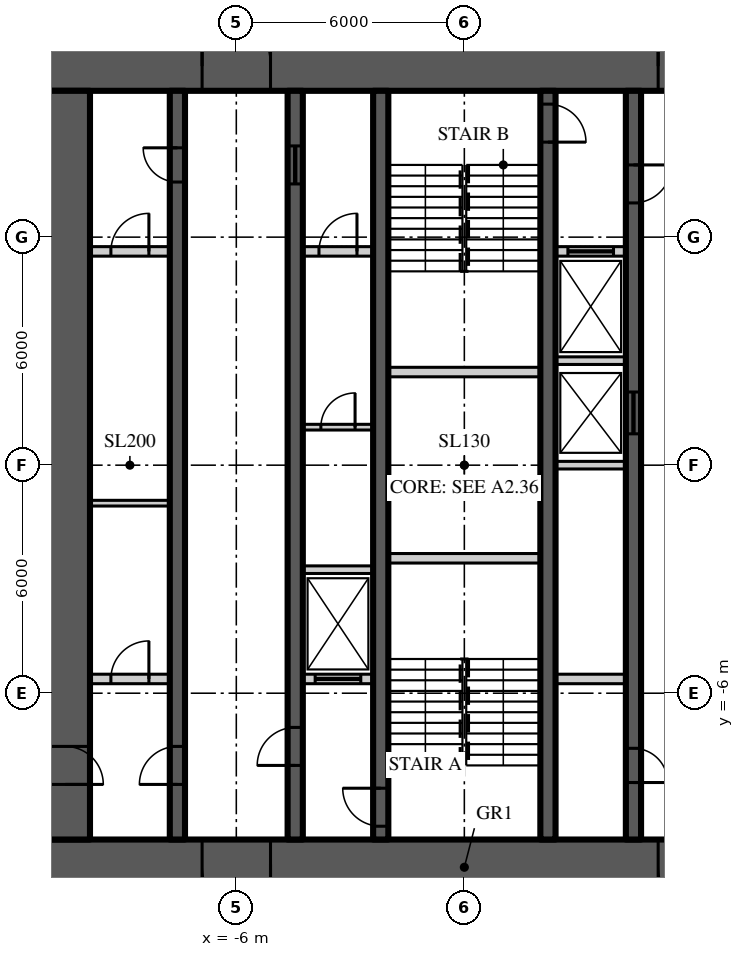
"""IFC4 building model, lengths in metres.
Left out: names, types, materials, properties, quantities, classifications, styles, units other than length and angle.
Written with IfcOpenShell. Run it as: python <this file> out.ifc"""

import sys

from ifc_helpers import new_model, si_unit, direction, frame, frame_2d, origin, place, context, subcontext, project, spatial, rectangle, extrude, element, fill, save


model = new_model("IFC4")
c1 = context("Model", 3, precision=1e-05, world=origin(), true_north=direction((0.0, 1.0)))
c2 = subcontext(c1, "Body", "Model", "MODEL_VIEW")
j1 = project(units=[si_unit("LENGTHUNIT", "METRE"), si_unit("PLANEANGLEUNIT", "RADIAN")], contexts=[c1])
p1 = place(None, origin())
s1 = spatial("IfcSite", under=j1, at=p1, CompositionType="ELEMENT")
p2 = place(p1, origin())
s2 = spatial("IfcBuilding", under=s1, at=p2, CompositionType="ELEMENT")
p3 = place(p2, frame((0.0, 0.0, 279.0)))
s3 = spatial("IfcBuildingStorey", under=s2, at=p3, CompositionType="ELEMENT", Elevation=279.0)
p4 = place(p3, frame((-11.15, 10.5, 0.0), z_axis=(0.0, 0.0, 1.0), x_axis=(1.0, 0.0, 0.0)))
e1 = element("IfcWall", 1, at=p4, inside=s3, PredefinedType="SHEAR", context=c2, shape_type="SweptSolid", body=[
    extrude(rectangle(XDim=22.3, YDim=1.3, at=frame_2d((11.15, 0.0))), origin(), (0.0, 0.0, 1.0), 3.9),
])
p5 = place(p4, frame((4.25, 0.0, 0.0)))
e2 = element("IfcOpeningElement", 2, at=p5, cuts=e1, PredefinedType="OPENING", context=c2, shape_type="SweptSolid", body=[
    extrude(rectangle(XDim=1.8, YDim=2.2, at=frame_2d((0.9, 1.1))), frame((0.0, 0.66, 0.0), z_axis=(0.0, -1.0, 0.0), x_axis=(1.0, 0.0, 0.0)), (0.0, 0.0, 1.0), 1.32),
])
p6 = place(p4, frame((16.25, 0.0, 0.0)))
e3 = element("IfcOpeningElement", 3, at=p6, cuts=e1, PredefinedType="OPENING", context=c2, shape_type="SweptSolid", body=[
    extrude(rectangle(XDim=1.8, YDim=2.2, at=frame_2d((0.9, 1.1))), frame((0.0, 0.66, 0.0), z_axis=(0.0, -1.0, 0.0), x_axis=(1.0, 0.0, 0.0)), (0.0, 0.0, 1.0), 1.32),
])
p7 = place(p3, frame((11.15, -10.5, 0.0), z_axis=(0.0, 0.0, 1.0), x_axis=(-1.0, 0.0, 0.0)))
e4 = element("IfcWall", 4, at=p7, inside=s3, PredefinedType="SHEAR", context=c2, shape_type="SweptSolid", body=[
    extrude(rectangle(XDim=22.3, YDim=1.3, at=frame_2d((11.15, 0.0))), origin(), (0.0, 0.0, 1.0), 3.9),
])
p8 = place(p7, frame((16.25, 0.0, 0.0)))
e5 = element("IfcOpeningElement", 5, at=p8, cuts=e4, PredefinedType="OPENING", context=c2, shape_type="SweptSolid", body=[
    extrude(rectangle(XDim=1.8, YDim=2.2, at=frame_2d((0.9, 1.1))), frame((0.0, 0.66, 0.0), z_axis=(0.0, -1.0, 0.0), x_axis=(1.0, 0.0, 0.0)), (0.0, 0.0, 1.0), 1.32),
])
p9 = place(p7, frame((4.25, 0.0, 0.0)))
e6 = element("IfcOpeningElement", 6, at=p9, cuts=e4, PredefinedType="OPENING", context=c2, shape_type="SweptSolid", body=[
    extrude(rectangle(XDim=1.8, YDim=2.2, at=frame_2d((0.9, 1.1))), frame((0.0, 0.66, 0.0), z_axis=(0.0, -1.0, 0.0), x_axis=(1.0, 0.0, 0.0)), (0.0, 0.0, 1.0), 1.32),
])
p10 = place(p3, frame((-10.5, 9.85, 0.0), z_axis=(0.0, 0.0, 1.0), x_axis=(0.0, -1.0, 0.0)))
e7 = element("IfcWall", 7, at=p10, inside=s3, PredefinedType="SHEAR", context=c2, shape_type="SweptSolid", body=[
    extrude(rectangle(XDim=19.7, YDim=1.3, at=frame_2d((9.85, 0.0))), origin(), (0.0, 0.0, 1.0), 3.9),
])
p11 = place(p10, frame((17.25, 0.0, 0.0)))
e8 = element("IfcOpeningElement", 8, at=p11, cuts=e7, PredefinedType="OPENING", context=c2, shape_type="SweptSolid", body=[
    extrude(rectangle(XDim=1.0, YDim=2.2, at=frame_2d((0.5, 1.1))), frame((0.0, 0.66, 0.0), z_axis=(0.0, -1.0, 0.0), x_axis=(1.0, 0.0, 0.0)), (0.0, 0.0, 1.0), 1.32),
])
p12 = place(p3, frame((-7.55, -9.85, 0.0), z_axis=(0.0, 0.0, 1.0), x_axis=(0.0, 1.0, 0.0)))
e9 = element("IfcWall", 9, at=p12, inside=s3, PredefinedType="SHEAR", context=c2, shape_type="SweptSolid", body=[
    extrude(rectangle(XDim=19.7, YDim=0.4, at=frame_2d((9.85, 0.0))), origin(), (0.0, 0.0, 1.0), 3.9),
])
p13 = place(p12, frame((1.45, 0.0, 0.0)))
e10 = element("IfcOpeningElement", 10, at=p13, cuts=e9, PredefinedType="OPENING", context=c2, shape_type="SweptSolid", body=[
    extrude(rectangle(XDim=1.0, YDim=2.2, at=frame_2d((0.5, 1.1))), frame((0.0, 0.21, 0.0), z_axis=(0.0, -1.0, 0.0), x_axis=(1.0, 0.0, 0.0)), (0.0, 0.0, 1.0), 0.42),
])
p14 = place(p12, frame((17.3, 0.0, 0.0)))
e11 = element("IfcOpeningElement", 11, at=p14, cuts=e9, PredefinedType="OPENING", context=c2, shape_type="SweptSolid", body=[
    extrude(rectangle(XDim=0.9, YDim=2.1, at=frame_2d((0.45, 1.05))), frame((0.0, 0.21, 0.0), z_axis=(0.0, -1.0, 0.0), x_axis=(1.0, 0.0, 0.0)), (0.0, 0.0, 1.0), 0.42),
])
p15 = place(p3, frame((-4.45, -9.85, 0.0), z_axis=(0.0, 0.0, 1.0), x_axis=(0.0, 1.0, 0.0)))
e12 = element("IfcWall", 12, at=p15, inside=s3, PredefinedType="SHEAR", context=c2, shape_type="SweptSolid", body=[
    extrude(rectangle(XDim=19.7, YDim=0.4, at=frame_2d((9.85, 0.0))), origin(), (0.0, 0.0, 1.0), 3.9),
])
p16 = place(p15, frame((1.95, 0.0, 0.0)))
e13 = element("IfcOpeningElement", 13, at=p16, cuts=e12, PredefinedType="OPENING", context=c2, shape_type="SweptSolid", body=[
    extrude(rectangle(XDim=1.0, YDim=2.2, at=frame_2d((0.5, 1.1))), frame((0.0, 0.21, 0.0), z_axis=(0.0, -1.0, 0.0), x_axis=(1.0, 0.0, 0.0)), (0.0, 0.0, 1.0), 0.42),
])
p17 = place(p15, frame((17.25, 0.0, 0.0)))
e14 = element("IfcOpeningElement", 14, at=p17, cuts=e12, PredefinedType="OPENING", context=c2, shape_type="SweptSolid", body=[
    extrude(rectangle(XDim=1.0, YDim=2.1, at=frame_2d((0.5, 1.05))), frame((0.0, 0.21, 0.0), z_axis=(0.0, -1.0, 0.0), x_axis=(1.0, 0.0, 0.0)), (0.0, 0.0, 1.0), 0.42),
])
p18 = place(p3, frame((4.45, 9.85, 0.0), z_axis=(0.0, 0.0, 1.0), x_axis=(0.0, -1.0, 0.0)))
e15 = element("IfcWall", 15, at=p18, inside=s3, PredefinedType="SHEAR", context=c2, shape_type="SweptSolid", body=[
    extrude(rectangle(XDim=19.7, YDim=0.4, at=frame_2d((9.85, 0.0))), origin(), (0.0, 0.0, 1.0), 3.9),
])
p19 = place(p18, frame((1.95, 0.0, 0.0)))
e16 = element("IfcOpeningElement", 16, at=p19, cuts=e15, PredefinedType="OPENING", context=c2, shape_type="SweptSolid", body=[
    extrude(rectangle(XDim=1.0, YDim=2.2, at=frame_2d((0.5, 1.1))), frame((0.0, 0.21, 0.0), z_axis=(0.0, -1.0, 0.0), x_axis=(1.0, 0.0, 0.0)), (0.0, 0.0, 1.0), 0.42),
])
p20 = place(p18, frame((17.3, 0.0, 0.0)))
e17 = element("IfcOpeningElement", 17, at=p20, cuts=e15, PredefinedType="OPENING", context=c2, shape_type="SweptSolid", body=[
    extrude(rectangle(XDim=0.9, YDim=2.1, at=frame_2d((0.45, 1.05))), frame((0.0, 0.21, 0.0), z_axis=(0.0, -1.0, 0.0), x_axis=(1.0, 0.0, 0.0)), (0.0, 0.0, 1.0), 0.42),
])
p21 = place(p18, frame((7.925, 0.0, 0.0)))
e18 = element("IfcOpeningElement", 18, at=p21, cuts=e15, PredefinedType="OPENING", context=c2, shape_type="SweptSolid", body=[
    extrude(rectangle(XDim=1.1, YDim=2.2, at=frame_2d((0.55, 1.1))), frame((0.0, 0.21, 0.0), z_axis=(0.0, -1.0, 0.0), x_axis=(1.0, 0.0, 0.0)), (0.0, 0.0, 1.0), 0.42),
])
p22 = place(p3, frame((-2.2, -9.85, 0.0), z_axis=(0.0, 0.0, 1.0), x_axis=(0.0, 1.0, 0.0)))
e19 = element("IfcWall", 19, at=p22, inside=s3, PredefinedType="SHEAR", context=c2, shape_type="SweptSolid", body=[
    extrude(rectangle(XDim=19.7, YDim=0.4, at=frame_2d((9.85, 0.0))), origin(), (0.0, 0.0, 1.0), 3.9),
])
p23 = place(p22, frame((0.35, 0.0, 0.0)))
e20 = element("IfcOpeningElement", 20, at=p23, cuts=e19, PredefinedType="OPENING", context=c2, shape_type="SweptSolid", body=[
    extrude(rectangle(XDim=1.0, YDim=2.2, at=frame_2d((0.5, 1.1))), frame((0.0, 0.21, 0.0), z_axis=(0.0, -1.0, 0.0), x_axis=(1.0, 0.0, 0.0)), (0.0, 0.0, 1.0), 0.42),
])
p24 = place(p3, frame((2.2, 9.85, 0.0), z_axis=(0.0, 0.0, 1.0), x_axis=(0.0, -1.0, 0.0)))
e21 = element("IfcWall", 21, at=p24, inside=s3, PredefinedType="SHEAR", context=c2, shape_type="SweptSolid", body=[
    extrude(rectangle(XDim=19.7, YDim=0.4, at=frame_2d((9.85, 0.0))), origin(), (0.0, 0.0, 1.0), 3.9),
])
p25 = place(p24, frame((0.35, 0.0, 0.0)))
e22 = element("IfcOpeningElement", 22, at=p25, cuts=e21, PredefinedType="OPENING", context=c2, shape_type="SweptSolid", body=[
    extrude(rectangle(XDim=1.0, YDim=2.2, at=frame_2d((0.5, 1.1))), frame((0.0, 0.21, 0.0), z_axis=(0.0, -1.0, 0.0), x_axis=(1.0, 0.0, 0.0)), (0.0, 0.0, 1.0), 0.42),
])
p26 = place(p3, frame((-9.85, 5.625, 0.0), z_axis=(0.0, 0.0, 1.0), x_axis=(1.0, 0.0, 0.0)))
e23 = element("IfcWall", 23, at=p26, inside=s3, PredefinedType="SOLIDWALL", context=c2, shape_type="SweptSolid", body=[
    extrude(rectangle(XDim=2.1, YDim=0.25, at=frame_2d((1.05, 0.0))), origin(), (0.0, 0.0, 1.0), 3.7),
])
p27 = place(p26, frame((0.55, 0.0, 0.0)))
e24 = element("IfcOpeningElement", 24, at=p27, cuts=e23, PredefinedType="OPENING", context=c2, shape_type="SweptSolid", body=[
    extrude(rectangle(XDim=1.0, YDim=2.2, at=frame_2d((0.5, 1.1))), frame((0.0, 0.135, 0.0), z_axis=(0.0, -1.0, 0.0), x_axis=(1.0, 0.0, 0.0)), (0.0, 0.0, 1.0), 0.27),
])
p28 = place(p3, frame((-4.25, 5.625, 0.0), z_axis=(0.0, 0.0, 1.0), x_axis=(1.0, 0.0, 0.0)))
e25 = element("IfcWall", 25, at=p28, inside=s3, PredefinedType="SOLIDWALL", context=c2, shape_type="SweptSolid", body=[
    extrude(rectangle(XDim=1.85, YDim=0.25, at=frame_2d((0.925, 0.0))), origin(), (0.0, 0.0, 1.0), 3.7),
])
p29 = place(p28, frame((0.425, 0.0, 0.0)))
e26 = element("IfcOpeningElement", 26, at=p29, cuts=e25, PredefinedType="OPENING", context=c2, shape_type="SweptSolid", body=[
    extrude(rectangle(XDim=1.0, YDim=2.2, at=frame_2d((0.5, 1.1))), frame((0.0, 0.135, 0.0), z_axis=(0.0, -1.0, 0.0), x_axis=(1.0, 0.0, 0.0)), (0.0, 0.0, 1.0), 0.27),
])
p30 = place(p3, frame((2.4, 5.625, 0.0), z_axis=(0.0, 0.0, 1.0), x_axis=(1.0, 0.0, 0.0)))
e27 = element("IfcWall", 27, at=p30, inside=s3, PredefinedType="SOLIDWALL", context=c2, shape_type="SweptSolid", body=[
    extrude(rectangle(XDim=1.85, YDim=0.25, at=frame_2d((0.925, 0.0))), origin(), (0.0, 0.0, 1.0), 3.7),
])
p31 = place(p30, frame((0.325, 0.0, 0.0)))
e28 = element("IfcOpeningElement", 28, at=p31, cuts=e27, PredefinedType="OPENING", context=c2, shape_type="SweptSolid", body=[
    extrude(rectangle(XDim=1.2, YDim=2.2, at=frame_2d((0.6, 1.1))), frame((0.0, 0.135, 0.0), z_axis=(0.0, -1.0, 0.0), x_axis=(1.0, 0.0, 0.0)), (0.0, 0.0, 1.0), 0.27),
])
p32 = place(p3, frame((-9.85, -5.625, 0.0), z_axis=(0.0, 0.0, 1.0), x_axis=(1.0, 0.0, 0.0)))
e29 = element("IfcWall", 29, at=p32, inside=s3, PredefinedType="SOLIDWALL", context=c2, shape_type="SweptSolid", body=[
    extrude(rectangle(XDim=2.1, YDim=0.25, at=frame_2d((1.05, 0.0))), origin(), (0.0, 0.0, 1.0), 3.7),
])
p33 = place(p32, frame((0.55, 0.0, 0.0)))
e30 = element("IfcOpeningElement", 30, at=p33, cuts=e29, PredefinedType="OPENING", context=c2, shape_type="SweptSolid", body=[
    extrude(rectangle(XDim=1.0, YDim=2.2, at=frame_2d((0.5, 1.1))), frame((0.0, 0.135, 0.0), z_axis=(0.0, -1.0, 0.0), x_axis=(1.0, 0.0, 0.0)), (0.0, 0.0, 1.0), 0.27),
])
p34 = place(p3, frame((-4.25, -5.625, 0.0), z_axis=(0.0, 0.0, 1.0), x_axis=(1.0, 0.0, 0.0)))
e31 = element("IfcWall", 31, at=p34, inside=s3, PredefinedType="SOLIDWALL", context=c2, shape_type="SweptSolid", body=[
    extrude(rectangle(XDim=1.85, YDim=0.25, at=frame_2d((0.925, 0.0))), origin(), (0.0, 0.0, 1.0), 3.7),
])
p35 = place(p34, frame((0.325, 0.0, 0.0)))
e32 = element("IfcOpeningElement", 32, at=p35, cuts=e31, PredefinedType="OPENING", context=c2, shape_type="SweptSolid", body=[
    extrude(rectangle(XDim=1.2, YDim=2.2, at=frame_2d((0.6, 1.1))), frame((0.0, 0.135, 0.0), z_axis=(0.0, -1.0, 0.0), x_axis=(1.0, 0.0, 0.0)), (0.0, 0.0, 1.0), 0.27),
])
p36 = place(p3, frame((2.4, -5.625, 0.0), z_axis=(0.0, 0.0, 1.0), x_axis=(1.0, 0.0, 0.0)))
e33 = element("IfcWall", 33, at=p36, inside=s3, PredefinedType="SOLIDWALL", context=c2, shape_type="SweptSolid", body=[
    extrude(rectangle(XDim=1.85, YDim=0.25, at=frame_2d((0.925, 0.0))), origin(), (0.0, 0.0, 1.0), 3.7),
])
for number, where, z_axis, x_axis in (
    (34, (-2.0, -2.45, 0.0), (0.0, 0.0, 1.0), (1.0, 0.0, 0.0)),
    (35, (-2.0, 2.45, 0.0), (0.0, 0.0, 1.0), (1.0, 0.0, 0.0)),
):
    element("IfcWall", number, at=place(p3, frame(where, z_axis=z_axis, x_axis=x_axis)), inside=s3, PredefinedType="SOLIDWALL", context=c2, shape_type="SweptSolid", body=[
        extrude(rectangle(XDim=4.0, YDim=0.25, at=frame_2d((2.0, 0.0))), origin(), (0.0, 0.0, 1.0), 3.7),
    ])
for number, where, z_axis, x_axis in (
    (36, (-4.25, -2.75, 0.0), (0.0, 0.0, 1.0), (1.0, 0.0, 0.0)),
    (37, (2.4, 0.0, 0.0), (0.0, 0.0, 1.0), (1.0, 0.0, 0.0)),
    (38, (2.4, 2.75, 0.0), (0.0, 0.0, 1.0), (1.0, 0.0, 0.0)),
):
    element("IfcWall", number, at=place(p3, frame(where, z_axis=z_axis, x_axis=x_axis)), inside=s3, PredefinedType="SOLIDWALL", context=c2, shape_type="SweptSolid", body=[
        extrude(rectangle(XDim=1.85, YDim=0.2, at=frame_2d((0.925, 0.0))), origin(), (0.0, 0.0, 1.0), 3.7),
    ])
p37 = place(p3, frame((-9.85, -1.0, 0.0), z_axis=(0.0, 0.0, 1.0), x_axis=(1.0, 0.0, 0.0)))
e39 = element("IfcWall", 39, at=p37, inside=s3, PredefinedType="SOLIDWALL", context=c2, shape_type="SweptSolid", body=[
    extrude(rectangle(XDim=2.1, YDim=0.15, at=frame_2d((1.05, 0.0))), origin(), (0.0, 0.0, 1.0), 3.77),
])
p38 = place(p3, frame((-4.25, 1.0, 0.0), z_axis=(0.0, 0.0, 1.0), x_axis=(1.0, 0.0, 0.0)))
e40 = element("IfcWall", 40, at=p38, inside=s3, PredefinedType="SOLIDWALL", context=c2, shape_type="SweptSolid", body=[
    extrude(rectangle(XDim=1.85, YDim=0.15, at=frame_2d((0.925, 0.0))), origin(), (0.0, 0.0, 1.0), 3.77),
])
p39 = place(p38, frame((0.475, 0.0, 0.0)))
e41 = element("IfcOpeningElement", 41, at=p39, cuts=e40, PredefinedType="OPENING", context=c2, shape_type="SweptSolid", body=[
    extrude(rectangle(XDim=0.9, YDim=2.1, at=frame_2d((0.45, 1.05))), frame((0.0, 0.085, 0.0), z_axis=(0.0, -1.0, 0.0), x_axis=(1.0, 0.0, 0.0)), (0.0, 0.0, 1.0), 0.17),
])
p40 = place(p5, origin())
e42 = element("IfcDoor", 42, at=p40, inside=s3, OperationType="DOUBLE_DOOR_DOUBLE_SWING", PredefinedType="DOOR", context=c2, shape_type="SweptSolid", body=[
    extrude(rectangle(XDim=1.8, YDim=2.2, at=frame_2d((0.9, 1.1))), frame((0.0, 0.025, 0.0), z_axis=(0.0, -1.0, 0.0), x_axis=(1.0, 0.0, 0.0)), (0.0, 0.0, 1.0), 0.05),
])
fill(e2, e42)
p41 = place(p8, origin())
e43 = element("IfcDoor", 43, at=p41, inside=s3, OperationType="DOUBLE_DOOR_DOUBLE_SWING", PredefinedType="DOOR", context=c2, shape_type="SweptSolid", body=[
    extrude(rectangle(XDim=1.8, YDim=2.2, at=frame_2d((0.9, 1.1))), frame((0.0, 0.025, 0.0), z_axis=(0.0, -1.0, 0.0), x_axis=(1.0, 0.0, 0.0)), (0.0, 0.0, 1.0), 0.05),
])
fill(e5, e43)
p42 = place(p6, origin())
e44 = element("IfcDoor", 44, at=p42, inside=s3, OperationType="DOUBLE_DOOR_DOUBLE_SWING", PredefinedType="DOOR", context=c2, shape_type="SweptSolid", body=[
    extrude(rectangle(XDim=1.8, YDim=2.2, at=frame_2d((0.9, 1.1))), frame((0.0, 0.025, 0.0), z_axis=(0.0, -1.0, 0.0), x_axis=(1.0, 0.0, 0.0)), (0.0, 0.0, 1.0), 0.05),
])
fill(e3, e44)
p43 = place(p9, origin())
e45 = element("IfcDoor", 45, at=p43, inside=s3, OperationType="DOUBLE_DOOR_DOUBLE_SWING", PredefinedType="DOOR", context=c2, shape_type="SweptSolid", body=[
    extrude(rectangle(XDim=1.8, YDim=2.2, at=frame_2d((0.9, 1.1))), frame((0.0, 0.025, 0.0), z_axis=(0.0, -1.0, 0.0), x_axis=(1.0, 0.0, 0.0)), (0.0, 0.0, 1.0), 0.05),
])
fill(e6, e45)
p44 = place(p13, origin())
e46 = element("IfcDoor", 46, at=p44, inside=s3, OperationType="SINGLE_SWING_LEFT", PredefinedType="DOOR", context=c2, shape_type="SweptSolid", body=[
    extrude(rectangle(XDim=1.0, YDim=2.2, at=frame_2d((0.5, 1.1))), frame((0.0, 0.025, 0.0), z_axis=(0.0, -1.0, 0.0), x_axis=(1.0, 0.0, 0.0)), (0.0, 0.0, 1.0), 0.05),
])
fill(e10, e46)
p45 = place(p11, origin())
e47 = element("IfcDoor", 47, at=p45, inside=s3, OperationType="SINGLE_SWING_RIGHT", PredefinedType="DOOR", context=c2, shape_type="SweptSolid", body=[
    extrude(rectangle(XDim=1.0, YDim=2.2, at=frame_2d((0.5, 1.1))), frame((0.0, 0.025, 0.0), z_axis=(0.0, -1.0, 0.0), x_axis=(1.0, 0.0, 0.0)), (0.0, 0.0, 1.0), 0.05),
])
fill(e8, e47)
p46 = place(p16, origin())
e48 = element("IfcDoor", 48, at=p46, inside=s3, OperationType="SINGLE_SWING_LEFT", PredefinedType="DOOR", context=c2, shape_type="SweptSolid", body=[
    extrude(rectangle(XDim=1.0, YDim=2.2, at=frame_2d((0.5, 1.1))), frame((0.0, 0.025, 0.0), z_axis=(0.0, -1.0, 0.0), x_axis=(1.0, 0.0, 0.0)), (0.0, 0.0, 1.0), 0.05),
])
fill(e13, e48)
p47 = place(p23, origin())
e49 = element("IfcDoor", 49, at=p47, inside=s3, OperationType="SINGLE_SWING_RIGHT", PredefinedType="DOOR", context=c2, shape_type="SweptSolid", body=[
    extrude(rectangle(XDim=1.0, YDim=2.2, at=frame_2d((0.5, 1.1))), frame((0.0, 0.025, 0.0), z_axis=(0.0, -1.0, 0.0), x_axis=(1.0, 0.0, 0.0)), (0.0, 0.0, 1.0), 0.05),
])
fill(e20, e49)
p48 = place(p19, origin())
e50 = element("IfcDoor", 50, at=p48, inside=s3, OperationType="SINGLE_SWING_LEFT", PredefinedType="DOOR", context=c2, shape_type="SweptSolid", body=[
    extrude(rectangle(XDim=1.0, YDim=2.2, at=frame_2d((0.5, 1.1))), frame((0.0, 0.025, 0.0), z_axis=(0.0, -1.0, 0.0), x_axis=(1.0, 0.0, 0.0)), (0.0, 0.0, 1.0), 0.05),
])
fill(e16, e50)
p49 = place(p25, origin())
e51 = element("IfcDoor", 51, at=p49, inside=s3, OperationType="SINGLE_SWING_RIGHT", PredefinedType="DOOR", context=c2, shape_type="SweptSolid", body=[
    extrude(rectangle(XDim=1.0, YDim=2.2, at=frame_2d((0.5, 1.1))), frame((0.0, 0.025, 0.0), z_axis=(0.0, -1.0, 0.0), x_axis=(1.0, 0.0, 0.0)), (0.0, 0.0, 1.0), 0.05),
])
fill(e22, e51)
p50 = place(p14, origin())
e52 = element("IfcDoor", 52, at=p50, inside=s3, OperationType="SINGLE_SWING_RIGHT", PredefinedType="DOOR", context=c2, shape_type="SweptSolid", body=[
    extrude(rectangle(XDim=0.9, YDim=2.1, at=frame_2d((0.45, 1.05))), frame((0.0, 0.025, 0.0), z_axis=(0.0, -1.0, 0.0), x_axis=(1.0, 0.0, 0.0)), (0.0, 0.0, 1.0), 0.05),
])
fill(e11, e52)
p51 = place(p17, origin())
e53 = element("IfcDoor", 53, at=p51, inside=s3, OperationType="SLIDING_TO_LEFT", PredefinedType="DOOR", context=c2, shape_type="SweptSolid", body=[
    extrude(rectangle(XDim=1.0, YDim=2.1, at=frame_2d((0.5, 1.05))), frame((0.0, 0.025, 0.0), z_axis=(0.0, -1.0, 0.0), x_axis=(1.0, 0.0, 0.0)), (0.0, 0.0, 1.0), 0.05),
])
fill(e14, e53)
p52 = place(p20, origin())
e54 = element("IfcDoor", 54, at=p52, inside=s3, OperationType="SINGLE_SWING_RIGHT", PredefinedType="DOOR", context=c2, shape_type="SweptSolid", body=[
    extrude(rectangle(XDim=0.9, YDim=2.1, at=frame_2d((0.45, 1.05))), frame((0.0, 0.025, 0.0), z_axis=(0.0, -1.0, 0.0), x_axis=(1.0, 0.0, 0.0)), (0.0, 0.0, 1.0), 0.05),
])
fill(e17, e54)
p53 = place(p21, origin())
e55 = element("IfcDoor", 55, at=p53, inside=s3, OperationType="SLIDING_TO_LEFT", PredefinedType="DOOR", context=c2, shape_type="SweptSolid", body=[
    extrude(rectangle(XDim=1.1, YDim=2.2, at=frame_2d((0.55, 1.1))), frame((0.0, 0.025, 0.0), z_axis=(0.0, -1.0, 0.0), x_axis=(1.0, 0.0, 0.0)), (0.0, 0.0, 1.0), 0.05),
])
fill(e18, e55)
p54 = place(p35, origin())
e56 = element("IfcDoor", 56, at=p54, inside=s3, OperationType="SLIDING_TO_LEFT", PredefinedType="DOOR", context=c2, shape_type="SweptSolid", body=[
    extrude(rectangle(XDim=1.2, YDim=2.2, at=frame_2d((0.6, 1.1))), frame((0.0, 0.025, 0.0), z_axis=(0.0, -1.0, 0.0), x_axis=(1.0, 0.0, 0.0)), (0.0, 0.0, 1.0), 0.05),
])
fill(e32, e56)
p55 = place(p31, origin())
e57 = element("IfcDoor", 57, at=p55, inside=s3, OperationType="SLIDING_TO_LEFT", PredefinedType="DOOR", context=c2, shape_type="SweptSolid", body=[
    extrude(rectangle(XDim=1.2, YDim=2.2, at=frame_2d((0.6, 1.1))), frame((0.0, 0.025, 0.0), z_axis=(0.0, -1.0, 0.0), x_axis=(1.0, 0.0, 0.0)), (0.0, 0.0, 1.0), 0.05),
])
fill(e28, e57)
p56 = place(p27, origin())
e58 = element("IfcDoor", 58, at=p56, inside=s3, OperationType="SINGLE_SWING_RIGHT", PredefinedType="DOOR", context=c2, shape_type="SweptSolid", body=[
    extrude(rectangle(XDim=1.0, YDim=2.2, at=frame_2d((0.5, 1.1))), frame((0.0, 0.025, 0.0), z_axis=(0.0, -1.0, 0.0), x_axis=(1.0, 0.0, 0.0)), (0.0, 0.0, 1.0), 0.05),
])
fill(e24, e58)
p57 = place(p33, origin())
e59 = element("IfcDoor", 59, at=p57, inside=s3, OperationType="SINGLE_SWING_RIGHT", PredefinedType="DOOR", context=c2, shape_type="SweptSolid", body=[
    extrude(rectangle(XDim=1.0, YDim=2.2, at=frame_2d((0.5, 1.1))), frame((0.0, 0.025, 0.0), z_axis=(0.0, -1.0, 0.0), x_axis=(1.0, 0.0, 0.0)), (0.0, 0.0, 1.0), 0.05),
])
fill(e30, e59)
p58 = place(p39, origin())
e60 = element("IfcDoor", 60, at=p58, inside=s3, OperationType="SINGLE_SWING_RIGHT", PredefinedType="DOOR", context=c2, shape_type="SweptSolid", body=[
    extrude(rectangle(XDim=0.9, YDim=2.1, at=frame_2d((0.45, 1.05))), frame((0.0, 0.025, 0.0), z_axis=(0.0, -1.0, 0.0), x_axis=(1.0, 0.0, 0.0)), (0.0, 0.0, 1.0), 0.05),
])
fill(e41, e60)
p59 = place(p29, origin())
e61 = element("IfcDoor", 61, at=p59, inside=s3, OperationType="SINGLE_SWING_RIGHT", PredefinedType="DOOR", context=c2, shape_type="SweptSolid", body=[
    extrude(rectangle(XDim=1.0, YDim=2.2, at=frame_2d((0.5, 1.1))), frame((0.0, 0.025, 0.0), z_axis=(0.0, -1.0, 0.0), x_axis=(1.0, 0.0, 0.0)), (0.0, 0.0, 1.0), 0.05),
])
fill(e26, e61)
save(model, sys.argv[1])
